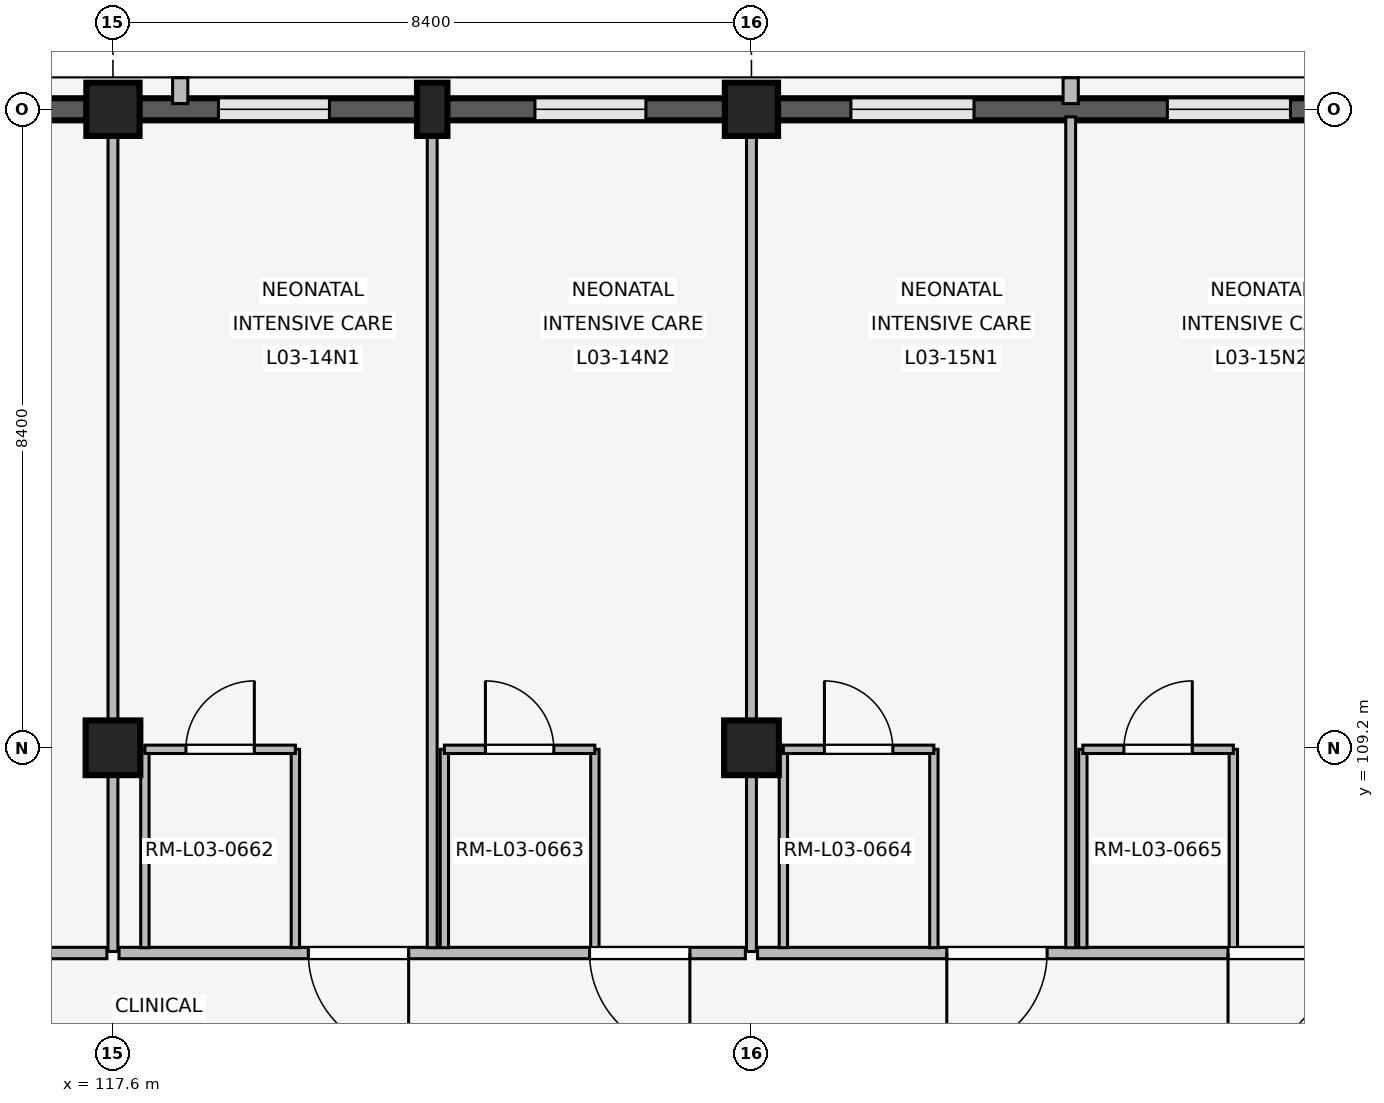
"""IFC4 building model, lengths in metres.
Left out: names, types, materials, properties, quantities, classifications, styles, units other than length and angle.
Written with IfcOpenShell. Run it as: python <this file> out.ifc"""

import sys

from ifc_helpers import new_model, si_unit, direction, frame, frame_2d, origin, origin_2d, place, context, subcontext, project, spatial, rectangle, extrude, element, fill, save


model = new_model("IFC4")
c1 = context("Model", 3, precision=1e-05, world=origin(), true_north=direction((0.0, 1.0)))
c2 = subcontext(c1, "Body", "Model", "MODEL_VIEW")
j1 = project(units=[si_unit("LENGTHUNIT", "METRE"), si_unit("PLANEANGLEUNIT", "RADIAN")], contexts=[c1])
p1 = place(None, origin())
s1 = spatial("IfcSite", under=j1, at=p1, CompositionType="ELEMENT")
p2 = place(p1, origin())
s2 = spatial("IfcBuilding", under=s1, at=p2, CompositionType="ELEMENT")
p3 = place(p2, frame((0.0, 0.0, 12.9)))
s3 = spatial("IfcBuildingStorey", under=s2, at=p3, CompositionType="ELEMENT", Elevation=12.9)
p4 = place(p3, frame((117.6, 109.2, 0.0), z_axis=(0.0, 0.0, 1.0), x_axis=(1.0, 0.0, 0.0)))
e1 = element("IfcColumn", 1, at=p4, inside=s3, PredefinedType="COLUMN", context=c2, shape_type="SweptSolid", body=[
    extrude(rectangle(XDim=0.72, YDim=0.72, at=origin_2d()), origin(), (0.0, 0.0, 1.0), 3.3),
])
p5 = place(p3, frame((117.6, 117.6, 0.0), z_axis=(0.0, 0.0, 1.0), x_axis=(1.0, 0.0, 0.0)))
e2 = element("IfcColumn", 2, at=p5, inside=s3, PredefinedType="COLUMN", context=c2, shape_type="SweptSolid", body=[
    extrude(rectangle(XDim=0.7, YDim=0.7, at=origin_2d()), origin(), (0.0, 0.0, 1.0), 3.3),
])
p6 = place(p3, frame((126.0, 109.2, 0.0), z_axis=(0.0, 0.0, 1.0), x_axis=(1.0, 0.0, 0.0)))
e3 = element("IfcColumn", 3, at=p6, inside=s3, PredefinedType="COLUMN", context=c2, shape_type="SweptSolid", body=[
    extrude(rectangle(XDim=0.72, YDim=0.72, at=origin_2d()), origin(), (0.0, 0.0, 1.0), 3.3),
])
p7 = place(p3, frame((126.0, 117.6, 0.0), z_axis=(0.0, 0.0, 1.0), x_axis=(1.0, 0.0, 0.0)))
e4 = element("IfcColumn", 4, at=p7, inside=s3, PredefinedType="COLUMN", context=c2, shape_type="SweptSolid", body=[
    extrude(rectangle(XDim=0.7, YDim=0.7, at=origin_2d()), origin(), (0.0, 0.0, 1.0), 3.3),
])
p8 = place(p3, frame((121.8, 117.6, 0.0), z_axis=(0.0, 0.0, 1.0), x_axis=(1.0, 0.0, 0.0)))
e5 = element("IfcColumn", 5, at=p8, inside=s3, PredefinedType="PILASTER", context=c2, shape_type="SweptSolid", body=[
    extrude(rectangle(XDim=0.4, YDim=0.7, at=origin_2d()), origin(), (0.0, 0.0, 1.0), 3.3),
])
p9 = place(p3, frame((109.545, 117.6, 0.0), z_axis=(0.0, 0.0, 1.0), x_axis=(1.0, 0.0, 0.0)))
e6 = element("IfcWall", 6, at=p9, inside=s3, PredefinedType="SOLIDWALL", context=c2, shape_type="SweptSolid", body=[
    extrude(rectangle(XDim=7.71, YDim=0.29, at=frame_2d((3.855, 0.0))), origin(), (0.0, 0.0, 1.0), 2.44),
])
p10 = place(p9, frame((0.963, 0.0, 0.85)))
e7 = element("IfcOpeningElement", 7, at=p10, cuts=e6, PredefinedType="OPENING", context=c2, shape_type="SweptSolid", body=[
    extrude(rectangle(XDim=1.62, YDim=0.95, at=frame_2d((0.81, 0.475))), frame((0.0, 0.155, 0.0), z_axis=(0.0, -1.0, 0.0), x_axis=(1.0, 0.0, 0.0)), (0.0, 0.0, 1.0), 0.31),
])
p11 = place(p9, frame((5.127, 0.0, 0.85)))
e8 = element("IfcOpeningElement", 8, at=p11, cuts=e6, PredefinedType="OPENING", context=c2, shape_type="SweptSolid", body=[
    extrude(rectangle(XDim=1.62, YDim=0.95, at=frame_2d((0.81, 0.475))), frame((0.0, 0.155, 0.0), z_axis=(0.0, -1.0, 0.0), x_axis=(1.0, 0.0, 0.0)), (0.0, 0.0, 1.0), 0.31),
])
p12 = place(p3, frame((117.945, 117.6, 0.0), z_axis=(0.0, 0.0, 1.0), x_axis=(1.0, 0.0, 0.0)))
e9 = element("IfcWall", 9, at=p12, inside=s3, PredefinedType="SOLIDWALL", context=c2, shape_type="SweptSolid", body=[
    extrude(rectangle(XDim=7.71, YDim=0.29, at=frame_2d((3.855, 0.0))), origin(), (0.0, 0.0, 1.0), 2.44),
])
p13 = place(p12, frame((1.043, 0.0, 0.85)))
e10 = element("IfcOpeningElement", 10, at=p13, cuts=e9, PredefinedType="OPENING", context=c2, shape_type="SweptSolid", body=[
    extrude(rectangle(XDim=1.46, YDim=0.85, at=frame_2d((0.73, 0.425))), frame((0.0, 0.155, 0.0), z_axis=(0.0, -1.0, 0.0), x_axis=(1.0, 0.0, 0.0)), (0.0, 0.0, 1.0), 0.31),
])
p14 = place(p12, frame((5.207, 0.0, 0.85)))
e11 = element("IfcOpeningElement", 11, at=p14, cuts=e9, PredefinedType="OPENING", context=c2, shape_type="SweptSolid", body=[
    extrude(rectangle(XDim=1.46, YDim=0.85, at=frame_2d((0.73, 0.425))), frame((0.0, 0.155, 0.0), z_axis=(0.0, -1.0, 0.0), x_axis=(1.0, 0.0, 0.0)), (0.0, 0.0, 1.0), 0.31),
])
p15 = place(p3, frame((118.485, 117.675, 0.0), z_axis=(0.0, 0.0, 1.0), x_axis=(0.0, 1.0, 0.0)))
e12 = element("IfcWall", 12, at=p15, inside=s3, PredefinedType="ELEMENTEDWALL", context=c2, shape_type="SweptSolid", body=[
    extrude(rectangle(XDim=0.34, YDim=0.2, at=frame_2d((0.17, 0.0))), origin(), (0.0, 0.0, 1.0), 2.42),
])
p16 = place(p3, frame((126.345, 117.6, 0.0), z_axis=(0.0, 0.0, 1.0), x_axis=(1.0, 0.0, 0.0)))
e13 = element("IfcWall", 13, at=p16, inside=s3, PredefinedType="SOLIDWALL", context=c2, shape_type="SweptSolid", body=[
    extrude(rectangle(XDim=7.71, YDim=0.29, at=frame_2d((3.855, 0.0))), origin(), (0.0, 0.0, 1.0), 2.44),
])
p17 = place(p16, frame((0.963, 0.0, 0.85)))
e14 = element("IfcOpeningElement", 14, at=p17, cuts=e13, PredefinedType="OPENING", context=c2, shape_type="SweptSolid", body=[
    extrude(rectangle(XDim=1.62, YDim=0.95, at=frame_2d((0.81, 0.475))), frame((0.0, 0.155, 0.0), z_axis=(0.0, -1.0, 0.0), x_axis=(1.0, 0.0, 0.0)), (0.0, 0.0, 1.0), 0.31),
])
p18 = place(p16, frame((5.127, 0.0, 0.85)))
e15 = element("IfcOpeningElement", 15, at=p18, cuts=e13, PredefinedType="OPENING", context=c2, shape_type="SweptSolid", body=[
    extrude(rectangle(XDim=1.62, YDim=0.95, at=frame_2d((0.81, 0.475))), frame((0.0, 0.155, 0.0), z_axis=(0.0, -1.0, 0.0), x_axis=(1.0, 0.0, 0.0)), (0.0, 0.0, 1.0), 0.31),
])
p19 = place(p3, frame((130.2, 117.675, 0.0), z_axis=(0.0, 0.0, 1.0), x_axis=(0.0, 1.0, 0.0)))
e16 = element("IfcWall", 16, at=p19, inside=s3, PredefinedType="ELEMENTEDWALL", context=c2, shape_type="SweptSolid", body=[
    extrude(rectangle(XDim=0.34, YDim=0.2, at=frame_2d((0.17, 0.0))), origin(), (0.0, 0.0, 1.0), 2.42),
])
p20 = place(p3, frame((117.52, 106.5, 0.0), z_axis=(0.0, 0.0, 1.0), x_axis=(-1.0, 0.0, 0.0)))
e17 = element("IfcWall", 17, at=p20, inside=s3, PredefinedType="PARTITIONING", context=c2, shape_type="SweptSolid", body=[
    extrude(rectangle(XDim=8.24, YDim=0.15, at=frame_2d((4.12, 0.0))), origin(), (0.0, 0.0, 1.0), 2.42),
])
p21 = place(p20, frame((3.495, 0.0, 0.0)))
e18 = element("IfcOpeningElement", 18, at=p21, cuts=e17, PredefinedType="OPENING", context=c2, shape_type="SweptSolid", body=[
    extrude(rectangle(XDim=1.25, YDim=2.2, at=frame_2d((0.625, 1.1))), frame((0.0, 0.085, 0.0), z_axis=(0.0, -1.0, 0.0), x_axis=(1.0, 0.0, 0.0)), (0.0, 0.0, 1.0), 0.17),
])
p22 = place(p3, frame((117.6, 106.52, 0.0), z_axis=(0.0, 0.0, 1.0), x_axis=(0.0, 1.0, 0.0)))
e19 = element("IfcWall", 19, at=p22, inside=s3, PredefinedType="PARTITIONING", context=c2, shape_type="SweptSolid", body=[
    extrude(rectangle(XDim=10.94, YDim=0.13, at=frame_2d((5.47, 0.0))), origin(), (0.0, 0.0, 1.0), 2.42),
])
p23 = place(p3, frame((125.92, 106.5, 0.0), z_axis=(0.0, 0.0, 1.0), x_axis=(-1.0, 0.0, 0.0)))
e20 = element("IfcWall", 20, at=p23, inside=s3, PredefinedType="PARTITIONING", context=c2, shape_type="SweptSolid", body=[
    extrude(rectangle(XDim=8.24, YDim=0.15, at=frame_2d((4.12, 0.0))), origin(), (0.0, 0.0, 1.0), 2.42),
])
p24 = place(p23, frame((0.73, 0.0, 0.0)))
e21 = element("IfcOpeningElement", 21, at=p24, cuts=e20, PredefinedType="OPENING", context=c2, shape_type="SweptSolid", body=[
    extrude(rectangle(XDim=1.32, YDim=2.25, at=frame_2d((0.66, 1.125))), frame((0.0, 0.085, 0.0), z_axis=(0.0, -1.0, 0.0), x_axis=(1.0, 0.0, 0.0)), (0.0, 0.0, 1.0), 0.17),
])
p25 = place(p23, frame((4.43, 0.0, 0.0)))
e22 = element("IfcOpeningElement", 22, at=p25, cuts=e20, PredefinedType="OPENING", context=c2, shape_type="SweptSolid", body=[
    extrude(rectangle(XDim=1.32, YDim=2.25, at=frame_2d((0.66, 1.125))), frame((0.0, 0.085, 0.0), z_axis=(0.0, -1.0, 0.0), x_axis=(1.0, 0.0, 0.0)), (0.0, 0.0, 1.0), 0.17),
])
p26 = place(p3, frame((121.8, 106.57, 0.0), z_axis=(0.0, 0.0, 1.0), x_axis=(0.0, 1.0, 0.0)))
e23 = element("IfcWall", 23, at=p26, inside=s3, PredefinedType="PARTITIONING", context=c2, shape_type="SweptSolid", body=[
    extrude(rectangle(XDim=10.93, YDim=0.13, at=frame_2d((5.465, 0.0))), origin(), (0.0, 0.0, 1.0), 2.42),
])
for number, where, z_axis, x_axis in (
    (24, (118.02, 106.57, 0.0), (0.0, 0.0, 1.0), (0.0, 1.0, 0.0)),
    (25, (120.0, 106.57, 0.0), (0.0, 0.0, 1.0), (0.0, 1.0, 0.0)),
):
    element("IfcWall", number, at=place(p3, frame(where, z_axis=z_axis, x_axis=x_axis)), inside=s3, PredefinedType="PARTITIONING", context=c2, shape_type="SweptSolid", body=[
        extrude(rectangle(XDim=2.61, YDim=0.11, at=frame_2d((1.305, 0.0))), origin(), (0.0, 0.0, 1.0), 2.42),
    ])
p27 = place(p3, frame((118.02, 109.18, 0.0), z_axis=(0.0, 0.0, 1.0), x_axis=(1.0, 0.0, 0.0)))
e26 = element("IfcWall", 26, at=p27, inside=s3, PredefinedType="PARTITIONING", context=c2, shape_type="SweptSolid", body=[
    extrude(rectangle(XDim=1.98, YDim=0.11, at=frame_2d((0.99, 0.0))), origin(), (0.0, 0.0, 1.0), 2.42),
])
p28 = place(p27, frame((0.54, 0.0, 0.0)))
e27 = element("IfcOpeningElement", 27, at=p28, cuts=e26, PredefinedType="OPENING", context=c2, shape_type="SweptSolid", body=[
    extrude(rectangle(XDim=0.9, YDim=2.1, at=frame_2d((0.45, 1.05))), frame((0.0, 0.065, 0.0), z_axis=(0.0, -1.0, 0.0), x_axis=(1.0, 0.0, 0.0)), (0.0, 0.0, 1.0), 0.13),
])
for number, where, z_axis, x_axis in (
    (28, (121.96, 106.57, 0.0), (0.0, 0.0, 1.0), (0.0, 1.0, 0.0)),
    (29, (123.94, 106.57, 0.0), (0.0, 0.0, 1.0), (0.0, 1.0, 0.0)),
):
    element("IfcWall", number, at=place(p3, frame(where, z_axis=z_axis, x_axis=x_axis)), inside=s3, PredefinedType="PARTITIONING", context=c2, shape_type="SweptSolid", body=[
        extrude(rectangle(XDim=2.61, YDim=0.11, at=frame_2d((1.305, 0.0))), origin(), (0.0, 0.0, 1.0), 2.42),
    ])
p29 = place(p3, frame((121.96, 109.18, 0.0), z_axis=(0.0, 0.0, 1.0), x_axis=(1.0, 0.0, 0.0)))
e30 = element("IfcWall", 30, at=p29, inside=s3, PredefinedType="PARTITIONING", context=c2, shape_type="SweptSolid", body=[
    extrude(rectangle(XDim=1.98, YDim=0.11, at=frame_2d((0.99, 0.0))), origin(), (0.0, 0.0, 1.0), 2.42),
])
p30 = place(p29, frame((0.54, 0.0, 0.0)))
e31 = element("IfcOpeningElement", 31, at=p30, cuts=e30, PredefinedType="OPENING", context=c2, shape_type="SweptSolid", body=[
    extrude(rectangle(XDim=0.9, YDim=2.1, at=frame_2d((0.45, 1.05))), frame((0.0, 0.065, 0.0), z_axis=(0.0, -1.0, 0.0), x_axis=(1.0, 0.0, 0.0)), (0.0, 0.0, 1.0), 0.13),
])
p31 = place(p3, frame((126.0, 106.52, 0.0), z_axis=(0.0, 0.0, 1.0), x_axis=(0.0, 1.0, 0.0)))
e32 = element("IfcWall", 32, at=p31, inside=s3, PredefinedType="PARTITIONING", context=c2, shape_type="SweptSolid", body=[
    extrude(rectangle(XDim=10.94, YDim=0.13, at=frame_2d((5.47, 0.0))), origin(), (0.0, 0.0, 1.0), 2.42),
])
p32 = place(p3, frame((134.26, 106.5, 0.0), z_axis=(0.0, 0.0, 1.0), x_axis=(-1.0, 0.0, 0.0)))
e33 = element("IfcWall", 33, at=p32, inside=s3, PredefinedType="PARTITIONING", context=c2, shape_type="SweptSolid", body=[
    extrude(rectangle(XDim=8.18, YDim=0.15, at=frame_2d((4.09, 0.0))), origin(), (0.0, 0.0, 1.0), 2.42),
])
p33 = place(p32, frame((0.67, 0.0, 0.0)))
e34 = element("IfcOpeningElement", 34, at=p33, cuts=e33, PredefinedType="OPENING", context=c2, shape_type="SweptSolid", body=[
    extrude(rectangle(XDim=1.32, YDim=2.25, at=frame_2d((0.66, 1.125))), frame((0.0, 0.085, 0.0), z_axis=(0.0, -1.0, 0.0), x_axis=(1.0, 0.0, 0.0)), (0.0, 0.0, 1.0), 0.17),
])
p34 = place(p32, frame((4.37, 0.0, 0.0)))
e35 = element("IfcOpeningElement", 35, at=p34, cuts=e33, PredefinedType="OPENING", context=c2, shape_type="SweptSolid", body=[
    extrude(rectangle(XDim=1.32, YDim=2.25, at=frame_2d((0.66, 1.125))), frame((0.0, 0.085, 0.0), z_axis=(0.0, -1.0, 0.0), x_axis=(1.0, 0.0, 0.0)), (0.0, 0.0, 1.0), 0.17),
])
p35 = place(p3, frame((130.2, 106.57, 0.0), z_axis=(0.0, 0.0, 1.0), x_axis=(0.0, 1.0, 0.0)))
e36 = element("IfcWall", 36, at=p35, inside=s3, PredefinedType="PARTITIONING", context=c2, shape_type="SweptSolid", body=[
    extrude(rectangle(XDim=10.93, YDim=0.13, at=frame_2d((5.465, 0.0))), origin(), (0.0, 0.0, 1.0), 2.42),
])
for number, where, z_axis, x_axis in (
    (37, (126.42, 106.57, 0.0), (0.0, 0.0, 1.0), (0.0, 1.0, 0.0)),
    (38, (128.4, 106.57, 0.0), (0.0, 0.0, 1.0), (0.0, 1.0, 0.0)),
):
    element("IfcWall", number, at=place(p3, frame(where, z_axis=z_axis, x_axis=x_axis)), inside=s3, PredefinedType="PARTITIONING", context=c2, shape_type="SweptSolid", body=[
        extrude(rectangle(XDim=2.61, YDim=0.11, at=frame_2d((1.305, 0.0))), origin(), (0.0, 0.0, 1.0), 2.42),
    ])
p36 = place(p3, frame((126.42, 109.18, 0.0), z_axis=(0.0, 0.0, 1.0), x_axis=(1.0, 0.0, 0.0)))
e39 = element("IfcWall", 39, at=p36, inside=s3, PredefinedType="PARTITIONING", context=c2, shape_type="SweptSolid", body=[
    extrude(rectangle(XDim=1.98, YDim=0.11, at=frame_2d((0.99, 0.0))), origin(), (0.0, 0.0, 1.0), 2.42),
])
p37 = place(p36, frame((0.54, 0.0, 0.0)))
e40 = element("IfcOpeningElement", 40, at=p37, cuts=e39, PredefinedType="OPENING", context=c2, shape_type="SweptSolid", body=[
    extrude(rectangle(XDim=0.9, YDim=2.1, at=frame_2d((0.45, 1.05))), frame((0.0, 0.065, 0.0), z_axis=(0.0, -1.0, 0.0), x_axis=(1.0, 0.0, 0.0)), (0.0, 0.0, 1.0), 0.13),
])
for number, where, z_axis, x_axis in (
    (41, (130.36, 106.57, 0.0), (0.0, 0.0, 1.0), (0.0, 1.0, 0.0)),
    (42, (132.34, 106.57, 0.0), (0.0, 0.0, 1.0), (0.0, 1.0, 0.0)),
):
    element("IfcWall", number, at=place(p3, frame(where, z_axis=z_axis, x_axis=x_axis)), inside=s3, PredefinedType="PARTITIONING", context=c2, shape_type="SweptSolid", body=[
        extrude(rectangle(XDim=2.61, YDim=0.11, at=frame_2d((1.305, 0.0))), origin(), (0.0, 0.0, 1.0), 2.42),
    ])
p38 = place(p3, frame((130.36, 109.18, 0.0), z_axis=(0.0, 0.0, 1.0), x_axis=(1.0, 0.0, 0.0)))
e43 = element("IfcWall", 43, at=p38, inside=s3, PredefinedType="PARTITIONING", context=c2, shape_type="SweptSolid", body=[
    extrude(rectangle(XDim=1.98, YDim=0.11, at=frame_2d((0.99, 0.0))), origin(), (0.0, 0.0, 1.0), 2.42),
])
p39 = place(p38, frame((0.54, 0.0, 0.0)))
e44 = element("IfcOpeningElement", 44, at=p39, cuts=e43, PredefinedType="OPENING", context=c2, shape_type="SweptSolid", body=[
    extrude(rectangle(XDim=0.9, YDim=2.1, at=frame_2d((0.45, 1.05))), frame((0.0, 0.065, 0.0), z_axis=(0.0, -1.0, 0.0), x_axis=(1.0, 0.0, 0.0)), (0.0, 0.0, 1.0), 0.13),
])
p40 = place(p13, origin())
e45 = element("IfcWindow", 45, at=p40, inside=s3, PartitioningType="SINGLE_PANEL", PredefinedType="WINDOW", context=c2, shape_type="SweptSolid", body=[
    extrude(rectangle(XDim=1.46, YDim=0.85, at=frame_2d((0.73, 0.425))), frame((0.0, 0.03, 0.0), z_axis=(0.0, -1.0, 0.0), x_axis=(1.0, 0.0, 0.0)), (0.0, 0.0, 1.0), 0.06),
])
fill(e10, e45)
p41 = place(p14, origin())
e46 = element("IfcWindow", 46, at=p41, inside=s3, PartitioningType="SINGLE_PANEL", PredefinedType="WINDOW", context=c2, shape_type="SweptSolid", body=[
    extrude(rectangle(XDim=1.46, YDim=0.85, at=frame_2d((0.73, 0.425))), frame((0.0, 0.03, 0.0), z_axis=(0.0, -1.0, 0.0), x_axis=(1.0, 0.0, 0.0)), (0.0, 0.0, 1.0), 0.06),
])
fill(e11, e46)
p42 = place(p17, origin())
e47 = element("IfcWindow", 47, at=p42, inside=s3, PartitioningType="SINGLE_PANEL", PredefinedType="WINDOW", context=c2, shape_type="SweptSolid", body=[
    extrude(rectangle(XDim=1.62, YDim=0.95, at=frame_2d((0.81, 0.475))), frame((0.0, 0.03, 0.0), z_axis=(0.0, -1.0, 0.0), x_axis=(1.0, 0.0, 0.0)), (0.0, 0.0, 1.0), 0.06),
])
fill(e14, e47)
p43 = place(p18, origin())
e48 = element("IfcWindow", 48, at=p43, inside=s3, PartitioningType="SINGLE_PANEL", PredefinedType="WINDOW", context=c2, shape_type="SweptSolid", body=[
    extrude(rectangle(XDim=1.62, YDim=0.95, at=frame_2d((0.81, 0.475))), frame((0.0, 0.03, 0.0), z_axis=(0.0, -1.0, 0.0), x_axis=(1.0, 0.0, 0.0)), (0.0, 0.0, 1.0), 0.06),
])
fill(e15, e48)
p44 = place(p24, origin())
e49 = element("IfcDoor", 49, at=p44, inside=s3, OperationType="SINGLE_SWING_LEFT", PredefinedType="DOOR", context=c2, shape_type="SweptSolid", body=[
    extrude(rectangle(XDim=1.32, YDim=2.25, at=frame_2d((0.66, 1.125))), frame((0.0, 0.025, 0.0), z_axis=(0.0, -1.0, 0.0), x_axis=(1.0, 0.0, 0.0)), (0.0, 0.0, 1.0), 0.05),
])
fill(e21, e49)
p45 = place(p25, origin())
e50 = element("IfcDoor", 50, at=p45, inside=s3, OperationType="SINGLE_SWING_LEFT", PredefinedType="DOOR", context=c2, shape_type="SweptSolid", body=[
    extrude(rectangle(XDim=1.32, YDim=2.25, at=frame_2d((0.66, 1.125))), frame((0.0, 0.025, 0.0), z_axis=(0.0, -1.0, 0.0), x_axis=(1.0, 0.0, 0.0)), (0.0, 0.0, 1.0), 0.05),
])
fill(e22, e50)
p46 = place(p28, origin())
e51 = element("IfcDoor", 51, at=p46, inside=s3, OperationType="SINGLE_SWING_RIGHT", PredefinedType="DOOR", context=c2, shape_type="SweptSolid", body=[
    extrude(rectangle(XDim=0.9, YDim=2.1, at=frame_2d((0.45, 1.05))), frame((0.0, 0.025, 0.0), z_axis=(0.0, -1.0, 0.0), x_axis=(1.0, 0.0, 0.0)), (0.0, 0.0, 1.0), 0.05),
])
fill(e27, e51)
p47 = place(p30, origin())
e52 = element("IfcDoor", 52, at=p47, inside=s3, OperationType="SINGLE_SWING_LEFT", PredefinedType="DOOR", context=c2, shape_type="SweptSolid", body=[
    extrude(rectangle(XDim=0.9, YDim=2.1, at=frame_2d((0.45, 1.05))), frame((0.0, 0.025, 0.0), z_axis=(0.0, -1.0, 0.0), x_axis=(1.0, 0.0, 0.0)), (0.0, 0.0, 1.0), 0.05),
])
fill(e31, e52)
p48 = place(p33, origin())
e53 = element("IfcDoor", 53, at=p48, inside=s3, OperationType="SINGLE_SWING_RIGHT", PredefinedType="DOOR", context=c2, shape_type="SweptSolid", body=[
    extrude(rectangle(XDim=1.32, YDim=2.25, at=frame_2d((0.66, 1.125))), frame((0.0, 0.025, 0.0), z_axis=(0.0, -1.0, 0.0), x_axis=(1.0, 0.0, 0.0)), (0.0, 0.0, 1.0), 0.05),
])
fill(e34, e53)
p49 = place(p34, origin())
e54 = element("IfcDoor", 54, at=p49, inside=s3, OperationType="SINGLE_SWING_RIGHT", PredefinedType="DOOR", context=c2, shape_type="SweptSolid", body=[
    extrude(rectangle(XDim=1.32, YDim=2.25, at=frame_2d((0.66, 1.125))), frame((0.0, 0.025, 0.0), z_axis=(0.0, -1.0, 0.0), x_axis=(1.0, 0.0, 0.0)), (0.0, 0.0, 1.0), 0.05),
])
fill(e35, e54)
p50 = place(p37, origin())
e55 = element("IfcDoor", 55, at=p50, inside=s3, OperationType="SINGLE_SWING_LEFT", PredefinedType="DOOR", context=c2, shape_type="SweptSolid", body=[
    extrude(rectangle(XDim=0.9, YDim=2.1, at=frame_2d((0.45, 1.05))), frame((0.0, 0.025, 0.0), z_axis=(0.0, -1.0, 0.0), x_axis=(1.0, 0.0, 0.0)), (0.0, 0.0, 1.0), 0.05),
])
fill(e40, e55)
p51 = place(p39, origin())
e56 = element("IfcDoor", 56, at=p51, inside=s3, OperationType="SINGLE_SWING_RIGHT", PredefinedType="DOOR", context=c2, shape_type="SweptSolid", body=[
    extrude(rectangle(XDim=0.9, YDim=2.1, at=frame_2d((0.45, 1.05))), frame((0.0, 0.025, 0.0), z_axis=(0.0, -1.0, 0.0), x_axis=(1.0, 0.0, 0.0)), (0.0, 0.0, 1.0), 0.05),
])
fill(e44, e56)
save(model, sys.argv[1])
